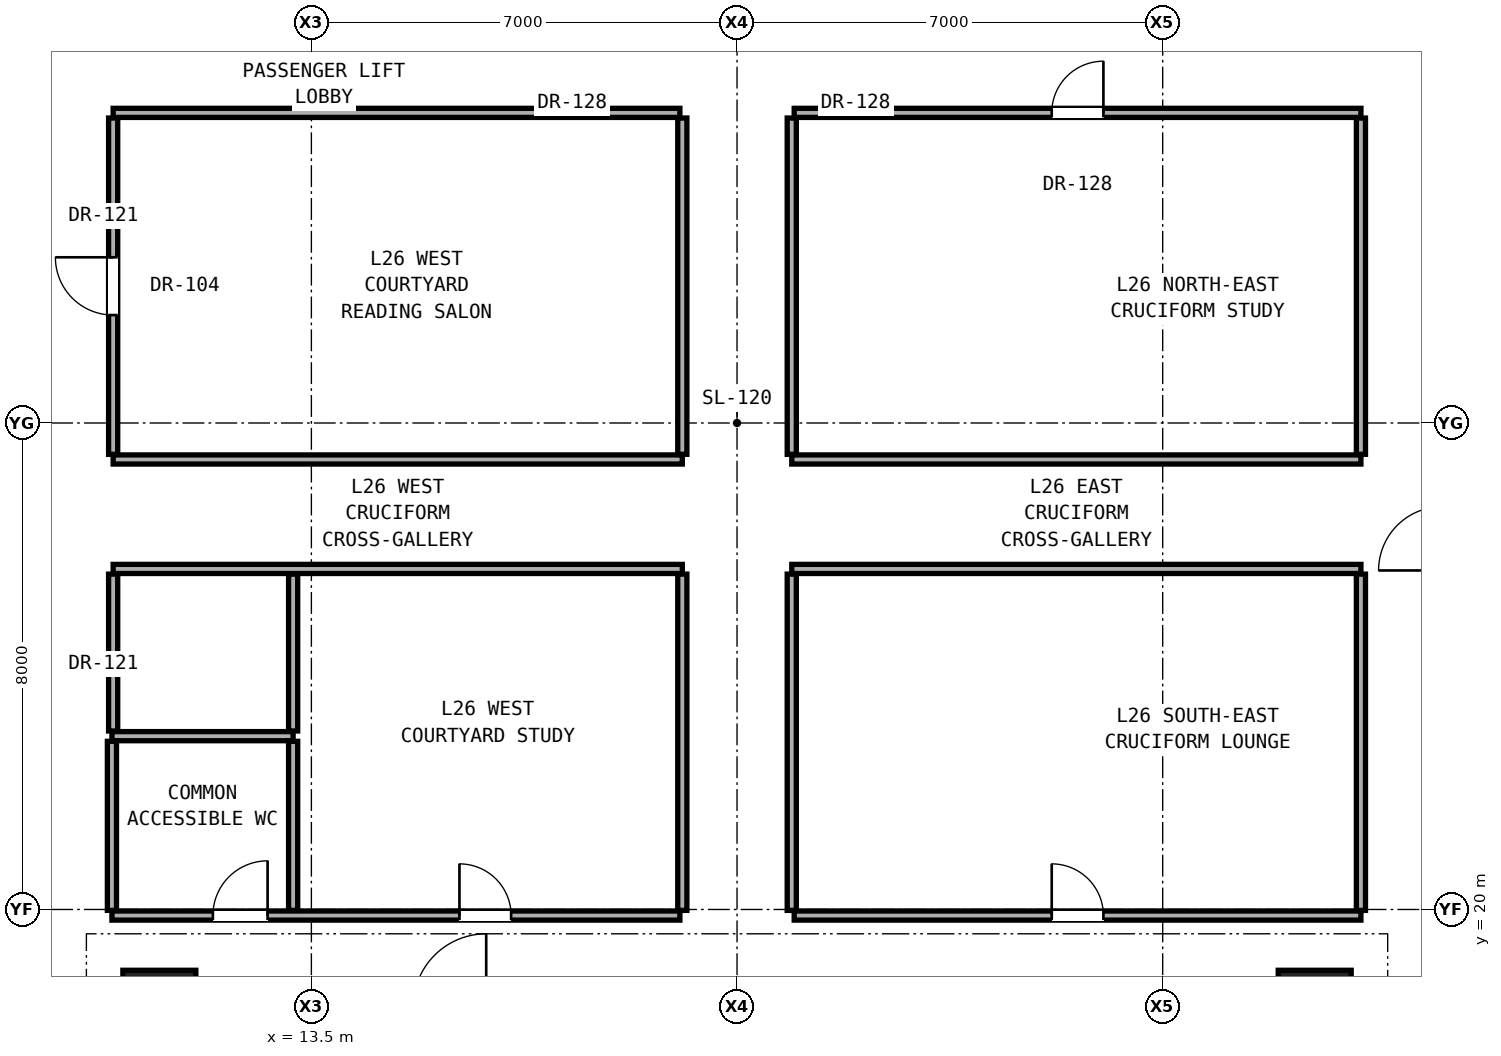
"""IFC4 building model, lengths in metres.
Left out: names, types, materials, properties, quantities, classifications, styles, units other than length and angle.
Written with IfcOpenShell. Run it as: python <this file> out.ifc"""

import sys

from ifc_helpers import new_model, si_unit, direction, frame, frame_2d, origin, origin_2d, place, context, subcontext, project, spatial, rectangle, extrude, element, fill, save


model = new_model("IFC4")
c1 = context("Model", 3, precision=1e-05, world=origin(), true_north=direction((0.0, 1.0)))
c2 = subcontext(c1, "Body", "Model", "MODEL_VIEW")
j1 = project(units=[si_unit("LENGTHUNIT", "METRE"), si_unit("PLANEANGLEUNIT", "RADIAN")], contexts=[c1])
p1 = place(None, origin())
s1 = spatial("IfcSite", under=j1, at=p1, CompositionType="ELEMENT")
p2 = place(p1, origin())
s2 = spatial("IfcBuilding", under=s1, at=p2, CompositionType="ELEMENT")
p3 = place(p2, frame((0.0, 0.0, 95.0)))
s3 = spatial("IfcBuildingStorey", under=s2, at=p3, CompositionType="ELEMENT", Elevation=95.0)
for number, where, z_axis, x_axis in (
    (1, (11.0, 18.4, 0.0), (0.0, 0.0, 1.0), (1.0, 0.0, 0.0)),
    (2, (30.0, 18.4, 0.0), (0.0, 0.0, 1.0), (1.0, 0.0, 0.0)),
):
    element("IfcColumn", number, at=place(p3, frame(where, z_axis=z_axis, x_axis=x_axis)), inside=s3, PredefinedType="COLUMN", context=c2, shape_type="SweptSolid", body=[
        extrude(rectangle(XDim=1.2, YDim=1.2, at=origin_2d()), origin(), (0.0, 0.0, 1.0), 3.3),
    ])
p4 = place(p3, frame((10.22, 19.9, 0.0), z_axis=(0.0, 0.0, 1.0), x_axis=(1.0, 0.0, 0.0)))
e3 = element("IfcWall", 3, at=p4, inside=s3, PredefinedType="PARTITIONING", context=c2, shape_type="SweptSolid", body=[
    extrude(rectangle(XDim=9.34, YDim=0.15, at=frame_2d((4.67, 0.0))), origin(), (0.0, 0.0, 1.0), 2.124),
])
p5 = place(p4, frame((1.66, 0.0, 0.0)))
e4 = element("IfcOpeningElement", 4, at=p5, cuts=e3, PredefinedType="OPENING", context=c2, shape_type="SweptSolid", body=[
    extrude(rectangle(XDim=0.9, YDim=2.1, at=frame_2d((0.45, 1.05))), frame((0.0, 0.085, 0.0), z_axis=(0.0, -1.0, 0.0), x_axis=(1.0, 0.0, 0.0)), (0.0, 0.0, 1.0), 0.17),
])
p6 = place(p4, frame((5.715, 0.0, 0.0)))
e5 = element("IfcOpeningElement", 5, at=p6, cuts=e3, PredefinedType="OPENING", context=c2, shape_type="SweptSolid", body=[
    extrude(rectangle(XDim=0.85, YDim=2.01, at=frame_2d((0.425, 1.005))), frame((0.0, 0.085, 0.0), z_axis=(0.0, -1.0, 0.0), x_axis=(1.0, 0.0, 0.0)), (0.0, 0.0, 1.0), 0.17),
])
p7 = place(p3, frame((21.44, 19.9, 0.0), z_axis=(0.0, 0.0, 1.0), x_axis=(1.0, 0.0, 0.0)))
e6 = element("IfcWall", 6, at=p7, inside=s3, PredefinedType="PARTITIONING", context=c2, shape_type="SweptSolid", body=[
    extrude(rectangle(XDim=9.32, YDim=0.15, at=frame_2d((4.66, 0.0))), origin(), (0.0, 0.0, 1.0), 2.124),
])
p8 = place(p7, frame((4.235, 0.0, 0.0)))
e7 = element("IfcOpeningElement", 7, at=p8, cuts=e6, PredefinedType="OPENING", context=c2, shape_type="SweptSolid", body=[
    extrude(rectangle(XDim=0.85, YDim=2.01, at=frame_2d((0.425, 1.005))), frame((0.0, 0.085, 0.0), z_axis=(0.0, -1.0, 0.0), x_axis=(1.0, 0.0, 0.0)), (0.0, 0.0, 1.0), 0.17),
])
p9 = place(p3, frame((10.22, 22.85, 0.0), z_axis=(0.0, 0.0, 1.0), x_axis=(1.0, 0.0, 0.0)))
e8 = element("IfcWall", 8, at=p9, inside=s3, PredefinedType="PARTITIONING", context=c2, shape_type="SweptSolid", body=[
    extrude(rectangle(XDim=2.98, YDim=0.15, at=frame_2d((1.49, 0.0))), origin(), (0.0, 0.0, 1.0), 2.124),
])
for number, where, z_axis, x_axis in (
    (9, (10.24, 25.6, 0.0), (0.0, 0.0, 1.0), (1.0, 0.0, 0.0)),
    (10, (21.4, 25.6, 0.0), (0.0, 0.0, 1.0), (1.0, 0.0, 0.0)),
    (11, (10.24, 27.4, 0.0), (0.0, 0.0, 1.0), (1.0, 0.0, 0.0)),
    (12, (21.4, 27.4, 0.0), (0.0, 0.0, 1.0), (1.0, 0.0, 0.0)),
):
    element("IfcWall", number, at=place(p3, frame(where, z_axis=z_axis, x_axis=x_axis)), inside=s3, PredefinedType="PARTITIONING", context=c2, shape_type="SweptSolid", body=[
        extrude(rectangle(XDim=9.36, YDim=0.15, at=frame_2d((4.68, 0.0))), origin(), (0.0, 0.0, 1.0), 2.124),
    ])
p10 = place(p3, frame((10.24, 33.1, 0.0), z_axis=(0.0, 0.0, 1.0), x_axis=(1.0, 0.0, 0.0)))
e13 = element("IfcWall", 13, at=p10, inside=s3, PredefinedType="PARTITIONING", context=c2, shape_type="SweptSolid", body=[
    extrude(rectangle(XDim=9.32, YDim=0.15, at=frame_2d((4.66, 0.0))), origin(), (0.0, 0.0, 1.0), 2.124),
])
p11 = place(p3, frame((21.44, 33.1, 0.0), z_axis=(0.0, 0.0, 1.0), x_axis=(1.0, 0.0, 0.0)))
e14 = element("IfcWall", 14, at=p11, inside=s3, PredefinedType="PARTITIONING", context=c2, shape_type="SweptSolid", body=[
    extrude(rectangle(XDim=9.32, YDim=0.15, at=frame_2d((4.66, 0.0))), origin(), (0.0, 0.0, 1.0), 2.124),
])
p12 = place(p11, frame((4.235, 0.0, 0.0)))
e15 = element("IfcOpeningElement", 15, at=p12, cuts=e14, PredefinedType="OPENING", context=c2, shape_type="SweptSolid", body=[
    extrude(rectangle(XDim=0.85, YDim=2.01, at=frame_2d((0.425, 1.005))), frame((0.0, 0.085, 0.0), z_axis=(0.0, -1.0, 0.0), x_axis=(1.0, 0.0, 0.0)), (0.0, 0.0, 1.0), 0.17),
])
p13 = place(p3, frame((10.22, 19.985, 0.0), z_axis=(0.0, 0.0, 1.0), x_axis=(0.0, 1.0, 0.0)))
e16 = element("IfcWall", 16, at=p13, inside=s3, PredefinedType="PARTITIONING", context=c2, shape_type="SweptSolid", body=[
    extrude(rectangle(XDim=2.78, YDim=0.15, at=frame_2d((1.39, 0.0))), origin(), (0.0, 0.0, 1.0), 3.08),
])
p14 = place(p3, frame((10.24, 22.935, 0.0), z_axis=(0.0, 0.0, 1.0), x_axis=(0.0, 1.0, 0.0)))
e17 = element("IfcWall", 17, at=p14, inside=s3, PredefinedType="PARTITIONING", context=c2, shape_type="SweptSolid", body=[
    extrude(rectangle(XDim=2.58, YDim=0.15, at=frame_2d((1.29, 0.0))), origin(), (0.0, 0.0, 1.0), 2.299),
])
p15 = place(p3, frame((10.24, 27.485, 0.0), z_axis=(0.0, 0.0, 1.0), x_axis=(0.0, 1.0, 0.0)))
e18 = element("IfcWall", 18, at=p15, inside=s3, PredefinedType="PARTITIONING", context=c2, shape_type="SweptSolid", body=[
    extrude(rectangle(XDim=5.53, YDim=0.15, at=frame_2d((2.765, 0.0))), origin(), (0.0, 0.0, 1.0), 2.299),
])
p16 = place(p15, frame((2.29, 0.0, 0.0)))
e19 = element("IfcOpeningElement", 19, at=p16, cuts=e18, PredefinedType="OPENING", context=c2, shape_type="SweptSolid", body=[
    extrude(rectangle(XDim=0.95, YDim=2.15, at=frame_2d((0.475, 1.075))), frame((0.0, 0.085, 0.0), z_axis=(0.0, -1.0, 0.0), x_axis=(1.0, 0.0, 0.0)), (0.0, 0.0, 1.0), 0.17),
])
p17 = place(p3, frame((13.2, 19.985, 0.0), z_axis=(0.0, 0.0, 1.0), x_axis=(0.0, 1.0, 0.0)))
e20 = element("IfcWall", 20, at=p17, inside=s3, PredefinedType="PARTITIONING", context=c2, shape_type="SweptSolid", body=[
    extrude(rectangle(XDim=2.78, YDim=0.15, at=frame_2d((1.39, 0.0))), origin(), (0.0, 0.0, 1.0), 3.08),
])
p18 = place(p3, frame((13.2, 22.935, 0.0), z_axis=(0.0, 0.0, 1.0), x_axis=(0.0, 1.0, 0.0)))
e21 = element("IfcWall", 21, at=p18, inside=s3, PredefinedType="PARTITIONING", context=c2, shape_type="SweptSolid", body=[
    extrude(rectangle(XDim=2.58, YDim=0.15, at=frame_2d((1.29, 0.0))), origin(), (0.0, 0.0, 1.0), 2.124),
])
for number, where, z_axis, x_axis in (
    (22, (19.6, 19.985, 0.0), (0.0, 0.0, 1.0), (0.0, 1.0, 0.0)),
    (23, (19.6, 27.485, 0.0), (0.0, 0.0, 1.0), (0.0, 1.0, 0.0)),
    (24, (21.4, 19.985, 0.0), (0.0, 0.0, 1.0), (0.0, 1.0, 0.0)),
    (25, (21.4, 27.485, 0.0), (0.0, 0.0, 1.0), (0.0, 1.0, 0.0)),
):
    element("IfcWall", number, at=place(p3, frame(where, z_axis=z_axis, x_axis=x_axis)), inside=s3, PredefinedType="PARTITIONING", context=c2, shape_type="SweptSolid", body=[
        extrude(rectangle(XDim=5.53, YDim=0.15, at=frame_2d((2.765, 0.0))), origin(), (0.0, 0.0, 1.0), 2.124),
    ])
for number, where, z_axis, x_axis in (
    (26, (30.76, 19.985, 0.0), (0.0, 0.0, 1.0), (0.0, 1.0, 0.0)),
    (27, (30.76, 27.485, 0.0), (0.0, 0.0, 1.0), (0.0, 1.0, 0.0)),
):
    element("IfcWall", number, at=place(p3, frame(where, z_axis=z_axis, x_axis=x_axis)), inside=s3, PredefinedType="PARTITIONING", context=c2, shape_type="SweptSolid", body=[
        extrude(rectangle(XDim=5.53, YDim=0.15, at=frame_2d((2.765, 0.0))), origin(), (0.0, 0.0, 1.0), 2.299),
    ])
p19 = place(p5, origin())
e28 = element("IfcDoor", 28, at=p19, inside=s3, OperationType="SINGLE_SWING_RIGHT", PredefinedType="DOOR", context=c2, shape_type="SweptSolid", body=[
    extrude(rectangle(XDim=0.9, YDim=2.1, at=frame_2d((0.45, 1.05))), frame((0.0, 0.025, 0.0), z_axis=(0.0, -1.0, 0.0), x_axis=(1.0, 0.0, 0.0)), (0.0, 0.0, 1.0), 0.05),
])
fill(e4, e28)
p20 = place(p6, origin())
e29 = element("IfcDoor", 29, at=p20, inside=s3, OperationType="SINGLE_SWING_LEFT", PredefinedType="DOOR", context=c2, shape_type="SweptSolid", body=[
    extrude(rectangle(XDim=0.85, YDim=2.01, at=frame_2d((0.425, 1.005))), frame((0.0, 0.025, 0.0), z_axis=(0.0, -1.0, 0.0), x_axis=(1.0, 0.0, 0.0)), (0.0, 0.0, 1.0), 0.05),
])
fill(e5, e29)
p21 = place(p16, origin())
e30 = element("IfcDoor", 30, at=p21, inside=s3, OperationType="SINGLE_SWING_RIGHT", PredefinedType="DOOR", context=c2, shape_type="SweptSolid", body=[
    extrude(rectangle(XDim=0.95, YDim=2.15, at=frame_2d((0.475, 1.075))), frame((0.0, 0.025, 0.0), z_axis=(0.0, -1.0, 0.0), x_axis=(1.0, 0.0, 0.0)), (0.0, 0.0, 1.0), 0.05),
])
fill(e19, e30)
p22 = place(p8, origin())
e31 = element("IfcDoor", 31, at=p22, inside=s3, OperationType="SINGLE_SWING_LEFT", PredefinedType="DOOR", context=c2, shape_type="SweptSolid", body=[
    extrude(rectangle(XDim=0.85, YDim=2.01, at=frame_2d((0.425, 1.005))), frame((0.0, 0.025, 0.0), z_axis=(0.0, -1.0, 0.0), x_axis=(1.0, 0.0, 0.0)), (0.0, 0.0, 1.0), 0.05),
])
fill(e7, e31)
p23 = place(p12, origin())
e32 = element("IfcDoor", 32, at=p23, inside=s3, OperationType="SINGLE_SWING_RIGHT", PredefinedType="DOOR", context=c2, shape_type="SweptSolid", body=[
    extrude(rectangle(XDim=0.85, YDim=2.01, at=frame_2d((0.425, 1.005))), frame((0.0, 0.025, 0.0), z_axis=(0.0, -1.0, 0.0), x_axis=(1.0, 0.0, 0.0)), (0.0, 0.0, 1.0), 0.05),
])
fill(e15, e32)
save(model, sys.argv[1])
